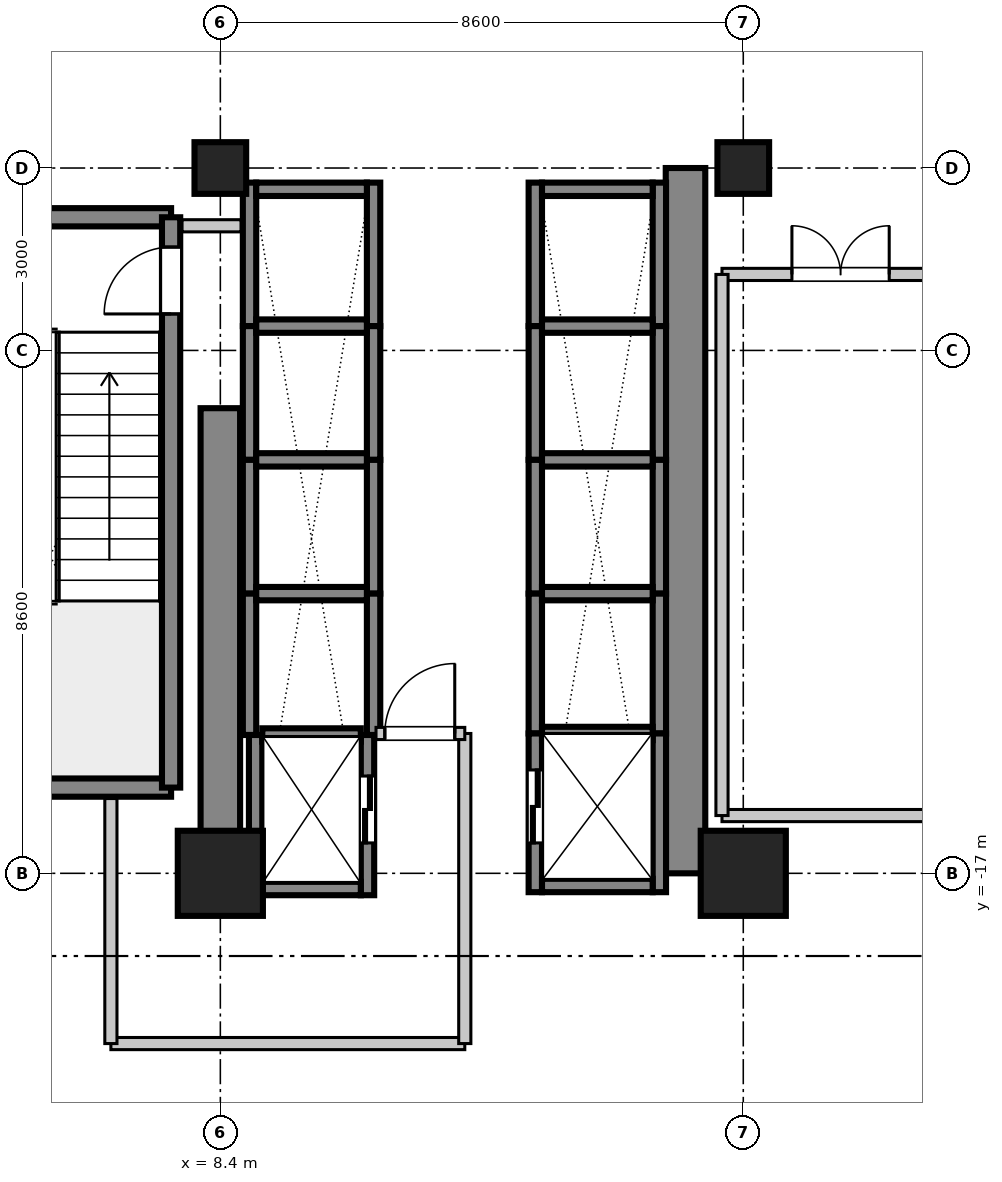
"""IFC4 building model, lengths in metres.
Left out: names, types, materials, properties, quantities, classifications, styles, units other than length and angle.
Written with IfcOpenShell. Run it as: python <this file> out.ifc"""

import sys

from ifc_helpers import new_model, si_unit, direction, frame, frame_2d, origin, origin_2d, place, context, subcontext, project, spatial, rectangle, extrude, source, transform, mapped, element, fill, save


model = new_model("IFC4")
c1 = context("Model", 3, precision=1e-05, world=origin(), true_north=direction((0.0, 1.0)))
c2 = subcontext(c1, "Body", "Model", "MODEL_VIEW")
j1 = project(units=[si_unit("LENGTHUNIT", "METRE"), si_unit("PLANEANGLEUNIT", "RADIAN")], contexts=[c1])
p1 = place(None, origin())
s1 = spatial("IfcSite", under=j1, at=p1, CompositionType="ELEMENT")
p2 = place(p1, origin())
s2 = spatial("IfcBuilding", under=s1, at=p2, CompositionType="ELEMENT")
p3 = place(p2, frame((0.0, 0.0, 83.5)))
s3 = spatial("IfcBuildingStorey", under=s2, at=p3, CompositionType="ELEMENT", Elevation=83.5)
m1 = source(origin(), c2, "Body", "SweptSolid", [
    extrude(rectangle(XDim=1.4, YDim=1.4, at=origin_2d()), origin(), (0.0, 0.0, 1.0), 4.755),
])
p4 = place(p3, frame((8.4, -17.0, 0.0), z_axis=(0.0, 0.0, 1.0), x_axis=(1.0, 0.0, 0.0)))
e1 = element("IfcColumn", 1, at=p4, inside=s3, PredefinedType="COLUMN", context=c2, shape_type="MappedRepresentation", body=[
    mapped(m1, transform((0.0, 0.0, 0.0), scale=1.0)),
])
m2 = source(origin(), c2, "Body", "SweptSolid", [
    extrude(rectangle(XDim=0.85, YDim=0.85, at=origin_2d()), origin(), (0.0, 0.0, 1.0), 4.755),
])
p5 = place(p3, frame((8.4, -5.4, 0.0), z_axis=(0.0, 0.0, 1.0), x_axis=(1.0, 0.0, 0.0)))
e2 = element("IfcColumn", 2, at=p5, inside=s3, PredefinedType="PILASTER", context=c2, shape_type="MappedRepresentation", body=[
    mapped(m2, transform((0.0, 0.0, 0.0), scale=1.0)),
])
p6 = place(p3, frame((17.0, -17.0, 0.0), z_axis=(0.0, 0.0, 1.0), x_axis=(1.0, 0.0, 0.0)))
e3 = element("IfcColumn", 3, at=p6, inside=s3, PredefinedType="COLUMN", context=c2, shape_type="MappedRepresentation", body=[
    mapped(m1, transform((0.0, 0.0, 0.0), scale=1.0)),
])
p7 = place(p3, frame((17.0, -5.4, 0.0), z_axis=(0.0, 0.0, 1.0), x_axis=(1.0, 0.0, 0.0)))
e4 = element("IfcColumn", 4, at=p7, inside=s3, PredefinedType="PILASTER", context=c2, shape_type="MappedRepresentation", body=[
    mapped(m2, transform((0.0, 0.0, 0.0), scale=1.0)),
])
m3 = source(origin(), c2, "Body", "SweptSolid", [
    extrude(rectangle(XDim=7.65, YDim=0.65, at=frame_2d((3.825, 0.0))), origin(), (0.0, 0.0, 1.0), 4.53),
])
p8 = place(p3, frame((8.4, -17.0, 0.0), z_axis=(0.0, 0.0, 1.0), x_axis=(0.0, 1.0, 0.0)))
e5 = element("IfcWall", 5, at=p8, inside=s3, PredefinedType="SHEAR", context=c2, shape_type="MappedRepresentation", body=[
    mapped(m3, transform((0.0, 0.0, 0.0), scale=1.0)),
])
m4 = source(origin(), c2, "Body", "SweptSolid", [
    extrude(rectangle(XDim=11.6, YDim=0.65, at=frame_2d((5.8, 0.0))), origin(), (0.0, 0.0, 1.0), 4.53),
])
p9 = place(p3, frame((16.05, -17.0, 0.0), z_axis=(0.0, 0.0, 1.0), x_axis=(0.0, 1.0, 0.0)))
e6 = element("IfcWall", 6, at=p9, inside=s3, PredefinedType="SHEAR", context=c2, shape_type="MappedRepresentation", body=[
    mapped(m4, transform((0.0, 0.0, 0.0), scale=1.0)),
])
m5 = source(origin(), c2, "Body", "SweptSolid", [
    extrude(rectangle(XDim=3.98, YDim=0.3, at=frame_2d((1.99, 0.0))), origin(), (0.0, 0.0, 1.0), 4.53),
])
for number, where, z_axis, x_axis in (
    (7, (3.61, -15.59, 0.0), (0.0, 0.0, 1.0), (1.0, 0.0, 0.0)),
    (8, (3.61, -6.21, 0.0), (0.0, 0.0, 1.0), (1.0, 0.0, 0.0)),
):
    element("IfcWall", number, at=place(p3, frame(where, z_axis=z_axis, x_axis=x_axis)), inside=s3, PredefinedType="SHEAR", context=c2, shape_type="MappedRepresentation", body=[
        mapped(m5, transform((0.0, 0.0, 0.0), scale=1.0)),
    ])
m6 = source(origin(), c2, "Body", "SweptSolid", [
    extrude(rectangle(XDim=9.38, YDim=0.3, at=frame_2d((4.69, 0.0))), origin(), (0.0, 0.0, 1.0), 4.53),
])
p10 = place(p3, frame((7.59, -15.59, 0.0), z_axis=(0.0, 0.0, 1.0), x_axis=(0.0, 1.0, 0.0)))
e9 = element("IfcWall", 9, at=p10, inside=s3, PredefinedType="SHEAR", context=c2, shape_type="MappedRepresentation", body=[
    mapped(m6, transform((0.0, 0.0, 0.0), scale=1.0)),
])
p11 = place(p10, frame((7.79, 0.0, 0.0)))
e10 = element("IfcOpeningElement", 10, at=p11, cuts=e9, PredefinedType="OPENING", context=c2, shape_type="SweptSolid", body=[
    extrude(rectangle(XDim=1.1, YDim=2.15, at=frame_2d((0.55, 1.075))), frame((0.0, 0.16, 0.0), z_axis=(0.0, -1.0, 0.0), x_axis=(1.0, 0.0, 0.0)), (0.0, 0.0, 1.0), 0.32),
])
m7 = source(origin(), c2, "Body", "SweptSolid", [
    extrude(rectangle(XDim=2.36, YDim=0.22, at=frame_2d((1.18, 0.0))), origin(), (0.0, 0.0, 1.0), 4.53),
])
for number, where, z_axis, x_axis in (
    (11, (13.58, -8.0, 0.0), (0.0, 0.0, 1.0), (0.0, 1.0, 0.0)),
    (12, (15.62, -8.0, 0.0), (0.0, 0.0, 1.0), (0.0, 1.0, 0.0)),
):
    element("IfcWall", number, at=place(p3, frame(where, z_axis=z_axis, x_axis=x_axis)), inside=s3, PredefinedType="SHEAR", context=c2, shape_type="MappedRepresentation", body=[
        mapped(m7, transform((0.0, 0.0, 0.0), scale=1.0)),
    ])
m8 = source(origin(), c2, "Body", "SweptSolid", [
    extrude(rectangle(XDim=1.82, YDim=0.22, at=frame_2d((0.91, 0.0))), origin(), (0.0, 0.0, 1.0), 4.53),
])
p12 = place(p3, frame((13.69, -5.75, 0.0), z_axis=(0.0, 0.0, 1.0), x_axis=(1.0, 0.0, 0.0)))
e13 = element("IfcWall", 13, at=p12, inside=s3, PredefinedType="SHEAR", context=c2, shape_type="MappedRepresentation", body=[
    mapped(m8, transform((0.0, 0.0, 0.0), scale=1.0)),
])
m9 = source(origin(), c2, "Body", "SweptSolid", [
    extrude(rectangle(XDim=2.2, YDim=0.22, at=frame_2d((1.1, 0.0))), origin(), (0.0, 0.0, 1.0), 4.53),
])
for number, where, z_axis, x_axis in (
    (14, (13.58, -10.2, 0.0), (0.0, 0.0, 1.0), (0.0, 1.0, 0.0)),
    (15, (15.62, -10.2, 0.0), (0.0, 0.0, 1.0), (0.0, 1.0, 0.0)),
):
    element("IfcWall", number, at=place(p3, frame(where, z_axis=z_axis, x_axis=x_axis)), inside=s3, PredefinedType="SHEAR", context=c2, shape_type="MappedRepresentation", body=[
        mapped(m9, transform((0.0, 0.0, 0.0), scale=1.0)),
    ])
m10 = source(origin(), c2, "Body", "SweptSolid", [
    extrude(rectangle(XDim=1.82, YDim=0.22, at=frame_2d((0.91, 0.0))), origin(), (0.0, 0.0, 1.0), 4.8),
])
p13 = place(p3, frame((13.69, -8.0, 0.0), z_axis=(0.0, 0.0, 1.0), x_axis=(1.0, 0.0, 0.0)))
e16 = element("IfcWall", 16, at=p13, inside=s3, PredefinedType="SHEAR", context=c2, shape_type="MappedRepresentation", body=[
    mapped(m10, transform((0.0, 0.0, 0.0), scale=1.0)),
])
for number, where, z_axis, x_axis in (
    (17, (13.58, -12.4, 0.0), (0.0, 0.0, 1.0), (0.0, 1.0, 0.0)),
    (18, (15.62, -12.4, 0.0), (0.0, 0.0, 1.0), (0.0, 1.0, 0.0)),
):
    element("IfcWall", number, at=place(p3, frame(where, z_axis=z_axis, x_axis=x_axis)), inside=s3, PredefinedType="SHEAR", context=c2, shape_type="MappedRepresentation", body=[
        mapped(m9, transform((0.0, 0.0, 0.0), scale=1.0)),
    ])
p14 = place(p3, frame((13.69, -10.2, 0.0), z_axis=(0.0, 0.0, 1.0), x_axis=(1.0, 0.0, 0.0)))
e19 = element("IfcWall", 19, at=p14, inside=s3, PredefinedType="SHEAR", context=c2, shape_type="MappedRepresentation", body=[
    mapped(m10, transform((0.0, 0.0, 0.0), scale=1.0)),
])
m11 = source(origin(), c2, "Body", "SweptSolid", [
    extrude(rectangle(XDim=2.3, YDim=0.22, at=frame_2d((1.15, 0.0))), origin(), (0.0, 0.0, 1.0), 4.53),
])
for number, where, z_axis, x_axis in (
    (20, (13.58, -14.7, 0.0), (0.0, 0.0, 1.0), (0.0, 1.0, 0.0)),
    (21, (15.62, -14.7, 0.0), (0.0, 0.0, 1.0), (0.0, 1.0, 0.0)),
):
    element("IfcWall", number, at=place(p3, frame(where, z_axis=z_axis, x_axis=x_axis)), inside=s3, PredefinedType="SHEAR", context=c2, shape_type="MappedRepresentation", body=[
        mapped(m11, transform((0.0, 0.0, 0.0), scale=1.0)),
    ])
p15 = place(p3, frame((13.69, -12.4, 0.0), z_axis=(0.0, 0.0, 1.0), x_axis=(1.0, 0.0, 0.0)))
e22 = element("IfcWall", 22, at=p15, inside=s3, PredefinedType="SHEAR", context=c2, shape_type="MappedRepresentation", body=[
    mapped(m10, transform((0.0, 0.0, 0.0), scale=1.0)),
])
for number, where, z_axis, x_axis in (
    (23, (8.88, -8.0, 0.0), (0.0, 0.0, 1.0), (0.0, 1.0, 0.0)),
    (24, (10.92, -8.0, 0.0), (0.0, 0.0, 1.0), (0.0, 1.0, 0.0)),
):
    element("IfcWall", number, at=place(p3, frame(where, z_axis=z_axis, x_axis=x_axis)), inside=s3, PredefinedType="SHEAR", context=c2, shape_type="MappedRepresentation", body=[
        mapped(m7, transform((0.0, 0.0, 0.0), scale=1.0)),
    ])
p16 = place(p3, frame((8.99, -5.75, 0.0), z_axis=(0.0, 0.0, 1.0), x_axis=(1.0, 0.0, 0.0)))
e25 = element("IfcWall", 25, at=p16, inside=s3, PredefinedType="SHEAR", context=c2, shape_type="MappedRepresentation", body=[
    mapped(m8, transform((0.0, 0.0, 0.0), scale=1.0)),
])
for number, where, z_axis, x_axis in (
    (26, (8.88, -10.2, 0.0), (0.0, 0.0, 1.0), (0.0, 1.0, 0.0)),
    (27, (10.92, -10.2, 0.0), (0.0, 0.0, 1.0), (0.0, 1.0, 0.0)),
):
    element("IfcWall", number, at=place(p3, frame(where, z_axis=z_axis, x_axis=x_axis)), inside=s3, PredefinedType="SHEAR", context=c2, shape_type="MappedRepresentation", body=[
        mapped(m9, transform((0.0, 0.0, 0.0), scale=1.0)),
    ])
p17 = place(p3, frame((8.99, -8.0, 0.0), z_axis=(0.0, 0.0, 1.0), x_axis=(1.0, 0.0, 0.0)))
e28 = element("IfcWall", 28, at=p17, inside=s3, PredefinedType="SHEAR", context=c2, shape_type="MappedRepresentation", body=[
    mapped(m10, transform((0.0, 0.0, 0.0), scale=1.0)),
])
for number, where, z_axis, x_axis in (
    (29, (8.88, -12.4, 0.0), (0.0, 0.0, 1.0), (0.0, 1.0, 0.0)),
    (30, (10.92, -12.4, 0.0), (0.0, 0.0, 1.0), (0.0, 1.0, 0.0)),
):
    element("IfcWall", number, at=place(p3, frame(where, z_axis=z_axis, x_axis=x_axis)), inside=s3, PredefinedType="SHEAR", context=c2, shape_type="MappedRepresentation", body=[
        mapped(m9, transform((0.0, 0.0, 0.0), scale=1.0)),
    ])
p18 = place(p3, frame((8.99, -10.2, 0.0), z_axis=(0.0, 0.0, 1.0), x_axis=(1.0, 0.0, 0.0)))
e31 = element("IfcWall", 31, at=p18, inside=s3, PredefinedType="SHEAR", context=c2, shape_type="MappedRepresentation", body=[
    mapped(m10, transform((0.0, 0.0, 0.0), scale=1.0)),
])
m12 = source(origin(), c2, "Body", "SweptSolid", [
    extrude(rectangle(XDim=2.325, YDim=0.22, at=frame_2d((1.163, 0.0))), origin(), (0.0, 0.0, 1.0), 4.53),
])
for number, where, z_axis, x_axis in (
    (32, (8.88, -14.725, 0.0), (0.0, 0.0, 1.0), (0.0, 1.0, 0.0)),
    (33, (10.92, -14.725, 0.0), (0.0, 0.0, 1.0), (0.0, 1.0, 0.0)),
):
    element("IfcWall", number, at=place(p3, frame(where, z_axis=z_axis, x_axis=x_axis)), inside=s3, PredefinedType="SHEAR", context=c2, shape_type="MappedRepresentation", body=[
        mapped(m12, transform((0.0, 0.0, 0.0), scale=1.0)),
    ])
p19 = place(p3, frame((8.99, -12.4, 0.0), z_axis=(0.0, 0.0, 1.0), x_axis=(1.0, 0.0, 0.0)))
e34 = element("IfcWall", 34, at=p19, inside=s3, PredefinedType="SHEAR", context=c2, shape_type="MappedRepresentation", body=[
    mapped(m10, transform((0.0, 0.0, 0.0), scale=1.0)),
])
m13 = source(origin(), c2, "Body", "SweptSolid", [
    extrude(rectangle(XDim=2.635, YDim=0.22, at=frame_2d((1.317, 0.0))), origin(), (0.0, 0.0, 1.0), 4.53),
])
p20 = place(p3, frame((8.98, -17.36, 0.0), z_axis=(0.0, 0.0, 1.0), x_axis=(0.0, 1.0, 0.0)))
e35 = element("IfcWall", 35, at=p20, inside=s3, PredefinedType="SHEAR", context=c2, shape_type="MappedRepresentation", body=[
    mapped(m13, transform((0.0, 0.0, 0.0), scale=1.0)),
])
p21 = place(p3, frame((10.82, -17.36, 0.0), z_axis=(0.0, 0.0, 1.0), x_axis=(0.0, 1.0, 0.0)))
e36 = element("IfcWall", 36, at=p21, inside=s3, PredefinedType="SHEAR", context=c2, shape_type="MappedRepresentation", body=[
    mapped(m13, transform((0.0, 0.0, 0.0), scale=1.0)),
])
p22 = place(p21, frame((0.86, 0.0, 0.0)))
e37 = element("IfcOpeningElement", 37, at=p22, cuts=e36, PredefinedType="OPENING", context=c2, shape_type="SweptSolid", body=[
    extrude(rectangle(XDim=1.1, YDim=2.2, at=frame_2d((0.55, 1.1))), frame((0.0, 0.12, 0.0), z_axis=(0.0, -1.0, 0.0), x_axis=(1.0, 0.0, 0.0)), (0.0, 0.0, 1.0), 0.24),
])
m14 = source(origin(), c2, "Body", "SweptSolid", [
    extrude(rectangle(XDim=1.62, YDim=0.22, at=frame_2d((0.81, 0.0))), origin(), (0.0, 0.0, 1.0), 4.53),
])
p23 = place(p3, frame((9.09, -17.25, 0.0), z_axis=(0.0, 0.0, 1.0), x_axis=(1.0, 0.0, 0.0)))
e38 = element("IfcWall", 38, at=p23, inside=s3, PredefinedType="SHEAR", context=c2, shape_type="MappedRepresentation", body=[
    mapped(m14, transform((0.0, 0.0, 0.0), scale=1.0)),
])
m15 = source(origin(), c2, "Body", "SweptSolid", [
    extrude(rectangle(XDim=1.62, YDim=0.22, at=frame_2d((0.81, 0.0))), origin(), (0.0, 0.0, 1.0), 4.8),
])
p24 = place(p3, frame((9.09, -14.725, 0.0), z_axis=(0.0, 0.0, 1.0), x_axis=(1.0, 0.0, 0.0)))
e39 = element("IfcWall", 39, at=p24, inside=s3, PredefinedType="SHEAR", context=c2, shape_type="MappedRepresentation", body=[
    mapped(m15, transform((0.0, 0.0, 0.0), scale=1.0)),
])
m16 = source(origin(), c2, "Body", "SweptSolid", [
    extrude(rectangle(XDim=2.61, YDim=0.22, at=frame_2d((1.305, 0.0))), origin(), (0.0, 0.0, 1.0), 4.53),
])
p25 = place(p3, frame((13.58, -17.31, 0.0), z_axis=(0.0, 0.0, 1.0), x_axis=(0.0, 1.0, 0.0)))
e40 = element("IfcWall", 40, at=p25, inside=s3, PredefinedType="SHEAR", context=c2, shape_type="MappedRepresentation", body=[
    mapped(m16, transform((0.0, 0.0, 0.0), scale=1.0)),
])
p26 = place(p25, frame((0.81, 0.0, 0.0)))
e41 = element("IfcOpeningElement", 41, at=p26, cuts=e40, PredefinedType="OPENING", context=c2, shape_type="SweptSolid", body=[
    extrude(rectangle(XDim=1.2, YDim=2.2, at=frame_2d((0.6, 1.1))), frame((0.0, 0.12, 0.0), z_axis=(0.0, -1.0, 0.0), x_axis=(1.0, 0.0, 0.0)), (0.0, 0.0, 1.0), 0.24),
])
p27 = place(p3, frame((15.62, -17.31, 0.0), z_axis=(0.0, 0.0, 1.0), x_axis=(0.0, 1.0, 0.0)))
e42 = element("IfcWall", 42, at=p27, inside=s3, PredefinedType="SHEAR", context=c2, shape_type="MappedRepresentation", body=[
    mapped(m16, transform((0.0, 0.0, 0.0), scale=1.0)),
])
p28 = place(p3, frame((13.69, -17.2, 0.0), z_axis=(0.0, 0.0, 1.0), x_axis=(1.0, 0.0, 0.0)))
e43 = element("IfcWall", 43, at=p28, inside=s3, PredefinedType="SHEAR", context=c2, shape_type="MappedRepresentation", body=[
    mapped(m8, transform((0.0, 0.0, 0.0), scale=1.0)),
])
p29 = place(p3, frame((13.69, -14.7, 0.0), z_axis=(0.0, 0.0, 1.0), x_axis=(1.0, 0.0, 0.0)))
e44 = element("IfcWall", 44, at=p29, inside=s3, PredefinedType="SHEAR", context=c2, shape_type="MappedRepresentation", body=[
    mapped(m10, transform((0.0, 0.0, 0.0), scale=1.0)),
])
m17 = source(origin(), c2, "Body", "SweptSolid", [
    extrude(rectangle(XDim=5.82, YDim=0.2, at=frame_2d((2.91, 0.0))), origin(), (0.0, 0.0, 1.0), 3.4),
])
p30 = place(p3, frame((6.6, -19.8, 0.0), z_axis=(0.0, 0.0, 1.0), x_axis=(1.0, 0.0, 0.0)))
e45 = element("IfcWall", 45, at=p30, inside=s3, PredefinedType="PARTITIONING", context=c2, shape_type="MappedRepresentation", body=[
    mapped(m17, transform((0.0, 0.0, 0.0), scale=1.0)),
])
m18 = source(origin(), c2, "Body", "SweptSolid", [
    extrude(rectangle(XDim=4.03, YDim=0.2, at=frame_2d((2.015, 0.0))), origin(), (0.0, 0.0, 1.0), 3.4),
])
p31 = place(p3, frame((6.6, -19.8, 0.0), z_axis=(0.0, 0.0, 1.0), x_axis=(0.0, 1.0, 0.0)))
e46 = element("IfcWall", 46, at=p31, inside=s3, PredefinedType="PARTITIONING", context=c2, shape_type="MappedRepresentation", body=[
    mapped(m18, transform((0.0, 0.0, 0.0), scale=1.0)),
])
m19 = source(origin(), c2, "Body", "SweptSolid", [
    extrude(rectangle(XDim=5.1, YDim=0.2, at=frame_2d((2.55, 0.0))), origin(), (0.0, 0.0, 1.0), 3.4),
])
p32 = place(p3, frame((12.42, -19.8, 0.0), z_axis=(0.0, 0.0, 1.0), x_axis=(0.0, 1.0, 0.0)))
e47 = element("IfcWall", 47, at=p32, inside=s3, PredefinedType="PARTITIONING", context=c2, shape_type="MappedRepresentation", body=[
    mapped(m19, transform((0.0, 0.0, 0.0), scale=1.0)),
])
m20 = source(origin(), c2, "Body", "SweptSolid", [
    extrude(rectangle(XDim=1.46, YDim=0.2, at=frame_2d((0.73, 0.0))), origin(), (0.0, 0.0, 1.0), 3.4),
])
p33 = place(p3, frame((10.96, -14.7, 0.0), z_axis=(0.0, 0.0, 1.0), x_axis=(1.0, 0.0, 0.0)))
e48 = element("IfcWall", 48, at=p33, inside=s3, PredefinedType="PARTITIONING", context=c2, shape_type="MappedRepresentation", body=[
    mapped(m20, transform((0.0, 0.0, 0.0), scale=1.0)),
])
p34 = place(p33, frame((0.145, 0.0, 0.0)))
e49 = element("IfcOpeningElement", 49, at=p34, cuts=e48, PredefinedType="OPENING", context=c2, shape_type="SweptSolid", body=[
    extrude(rectangle(XDim=1.15, YDim=2.15, at=frame_2d((0.575, 1.075))), frame((0.0, 0.11, 0.0), z_axis=(0.0, -1.0, 0.0), x_axis=(1.0, 0.0, 0.0)), (0.0, 0.0, 1.0), 0.22),
])
m21 = source(origin(), c2, "Body", "SweptSolid", [
    extrude(rectangle(XDim=0.97, YDim=0.2, at=frame_2d((0.485, 0.0))), origin(), (0.0, 0.0, 1.0), 3.4),
])
p35 = place(p3, frame((7.77, -6.35, 0.0), z_axis=(0.0, 0.0, 1.0), x_axis=(1.0, 0.0, 0.0)))
e50 = element("IfcWall", 50, at=p35, inside=s3, PredefinedType="PARTITIONING", context=c2, shape_type="MappedRepresentation", body=[
    mapped(m21, transform((0.0, 0.0, 0.0), scale=1.0)),
])
m22 = source(origin(), c2, "Body", "SweptSolid", [
    extrude(rectangle(XDim=7.47, YDim=0.2, at=frame_2d((3.735, 0.0))), origin(), (0.0, 0.0, 1.0), 3.4),
])
p36 = place(p3, frame((16.65, -16.05, 0.0), z_axis=(0.0, 0.0, 1.0), x_axis=(1.0, 0.0, 0.0)))
e51 = element("IfcWall", 51, at=p36, inside=s3, PredefinedType="PARTITIONING", context=c2, shape_type="MappedRepresentation", body=[
    mapped(m22, transform((0.0, 0.0, 0.0), scale=1.0)),
])
p37 = place(p3, frame((16.65, -7.15, 0.0), z_axis=(0.0, 0.0, 1.0), x_axis=(1.0, 0.0, 0.0)))
e52 = element("IfcWall", 52, at=p37, inside=s3, PredefinedType="PARTITIONING", context=c2, shape_type="MappedRepresentation", body=[
    mapped(m22, transform((0.0, 0.0, 0.0), scale=1.0)),
])
p38 = place(p37, frame((1.15, 0.0, 0.0)))
e53 = element("IfcOpeningElement", 53, at=p38, cuts=e52, PredefinedType="OPENING", context=c2, shape_type="SweptSolid", body=[
    extrude(rectangle(XDim=1.6, YDim=2.15, at=frame_2d((0.8, 1.075))), frame((0.0, 0.11, 0.0), z_axis=(0.0, -1.0, 0.0), x_axis=(1.0, 0.0, 0.0)), (0.0, 0.0, 1.0), 0.22),
])
m23 = source(origin(), c2, "Body", "SweptSolid", [
    extrude(rectangle(XDim=8.9, YDim=0.2, at=frame_2d((4.45, 0.0))), origin(), (0.0, 0.0, 1.0), 3.4),
])
p39 = place(p3, frame((16.65, -16.05, 0.0), z_axis=(0.0, 0.0, 1.0), x_axis=(0.0, 1.0, 0.0)))
e54 = element("IfcWall", 54, at=p39, inside=s3, PredefinedType="PARTITIONING", context=c2, shape_type="MappedRepresentation", body=[
    mapped(m23, transform((0.0, 0.0, 0.0), scale=1.0)),
])
m24 = source(origin(), c2, "Body", "SweptSolid", [
    extrude(rectangle(XDim=1.1, YDim=2.15, at=frame_2d((0.55, 1.075))), frame((0.0, 0.025, 0.0), z_axis=(0.0, -1.0, 0.0), x_axis=(1.0, 0.0, 0.0)), (0.0, 0.0, 1.0), 0.05),
])
p40 = place(p11, origin())
e55 = element("IfcDoor", 55, at=p40, inside=s3, OperationType="SINGLE_SWING_LEFT", PredefinedType="DOOR", context=c2, shape_type="MappedRepresentation", body=[
    mapped(m24, transform((0.0, 0.0, 0.0), scale=1.0)),
])
fill(e10, e55)
m25 = source(origin(), c2, "Body", "SweptSolid", [
    extrude(rectangle(XDim=1.1, YDim=2.2, at=frame_2d((0.55, 1.1))), frame((0.0, 0.025, 0.0), z_axis=(0.0, -1.0, 0.0), x_axis=(1.0, 0.0, 0.0)), (0.0, 0.0, 1.0), 0.05),
])
p41 = place(p22, frame((1.1, 0.0, 0.0), z_axis=(0.0, 0.0, 1.0), x_axis=(-1.0, 0.0, 0.0)))
e56 = element("IfcDoor", 56, at=p41, inside=s3, OperationType="DOUBLE_DOOR_SLIDING", PredefinedType="DOOR", context=c2, shape_type="MappedRepresentation", body=[
    mapped(m25, transform((0.0, 0.0, 0.0), scale=1.0)),
])
fill(e37, e56)
m26 = source(origin(), c2, "Body", "SweptSolid", [
    extrude(rectangle(XDim=1.2, YDim=2.2, at=frame_2d((0.6, 1.1))), frame((0.0, 0.025, 0.0), z_axis=(0.0, -1.0, 0.0), x_axis=(1.0, 0.0, 0.0)), (0.0, 0.0, 1.0), 0.05),
])
p42 = place(p26, origin())
e57 = element("IfcDoor", 57, at=p42, inside=s3, OperationType="DOUBLE_DOOR_SLIDING", PredefinedType="DOOR", context=c2, shape_type="MappedRepresentation", body=[
    mapped(m26, transform((0.0, 0.0, 0.0), scale=1.0)),
])
fill(e41, e57)
m27 = source(origin(), c2, "Body", "SweptSolid", [
    extrude(rectangle(XDim=1.15, YDim=2.15, at=frame_2d((0.575, 1.075))), frame((0.0, 0.025, 0.0), z_axis=(0.0, -1.0, 0.0), x_axis=(1.0, 0.0, 0.0)), (0.0, 0.0, 1.0), 0.05),
])
p43 = place(p34, origin())
e58 = element("IfcDoor", 58, at=p43, inside=s3, OperationType="SINGLE_SWING_RIGHT", PredefinedType="DOOR", context=c2, shape_type="MappedRepresentation", body=[
    mapped(m27, transform((0.0, 0.0, 0.0), scale=1.0)),
])
fill(e49, e58)
m28 = source(origin(), c2, "Body", "SweptSolid", [
    extrude(rectangle(XDim=1.6, YDim=2.15, at=frame_2d((0.8, 1.075))), frame((0.0, 0.025, 0.0), z_axis=(0.0, -1.0, 0.0), x_axis=(1.0, 0.0, 0.0)), (0.0, 0.0, 1.0), 0.05),
])
p44 = place(p38, frame((1.6, 0.0, 0.0), z_axis=(0.0, 0.0, 1.0), x_axis=(-1.0, 0.0, 0.0)))
e59 = element("IfcDoor", 59, at=p44, inside=s3, OperationType="DOUBLE_DOOR_SINGLE_SWING", PredefinedType="DOOR", context=c2, shape_type="MappedRepresentation", body=[
    mapped(m28, transform((0.0, 0.0, 0.0), scale=1.0)),
])
fill(e53, e59)
save(model, sys.argv[1])
